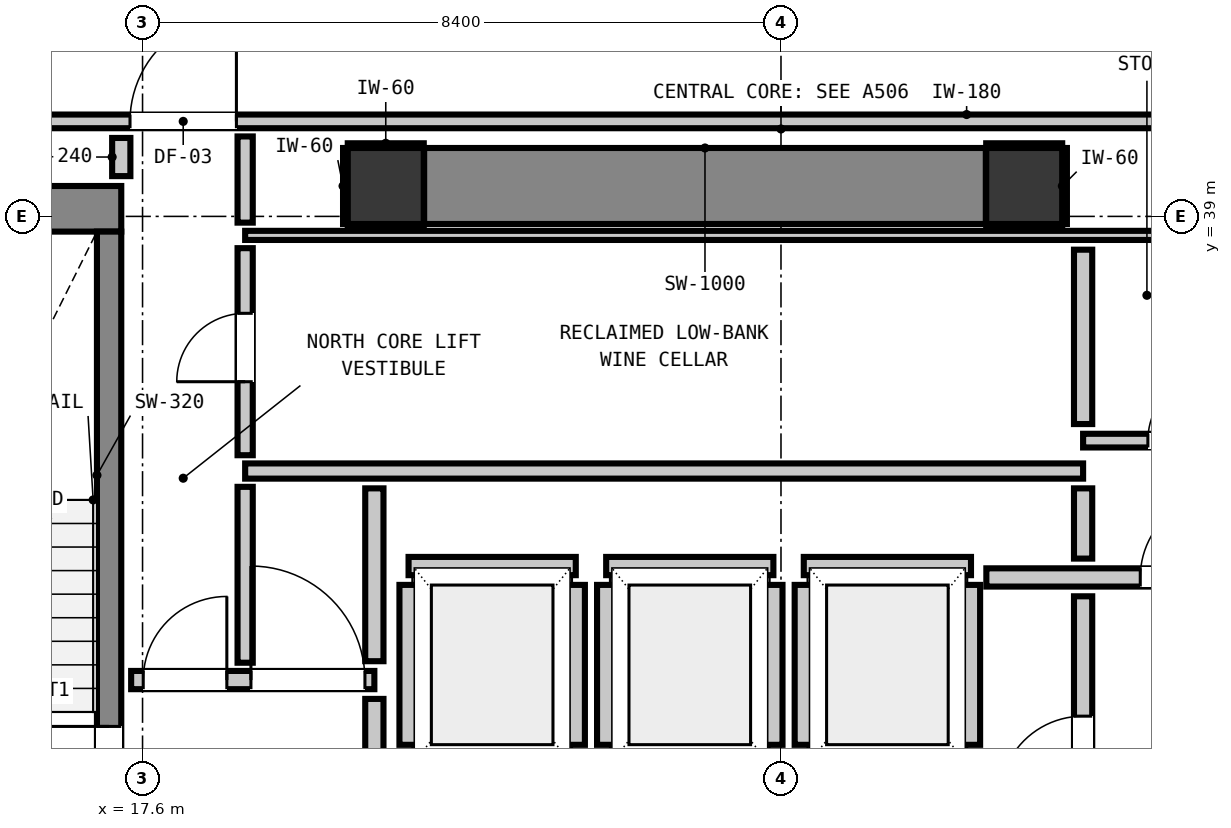
"""IFC4 building model, lengths in metres.
Left out: names, types, materials, properties, quantities, classifications, styles, units other than length and angle.
Written with IfcOpenShell. Run it as: python <this file> out.ifc"""

import sys

from ifc_helpers import new_model, si_unit, direction, frame, frame_2d, origin, origin_2d, place, context, subcontext, project, spatial, rectangle, extrude, element, fill, save


model = new_model("IFC4")
c1 = context("Model", 3, precision=1e-05, world=origin(), true_north=direction((0.0, 1.0)))
c2 = subcontext(c1, "Body", "Model", "MODEL_VIEW")
j1 = project(units=[si_unit("LENGTHUNIT", "METRE"), si_unit("PLANEANGLEUNIT", "RADIAN")], contexts=[c1])
p1 = place(None, origin())
s1 = spatial("IfcSite", under=j1, at=p1, CompositionType="ELEMENT")
p2 = place(p1, origin())
s2 = spatial("IfcBuilding", under=s1, at=p2, CompositionType="ELEMENT")
p3 = place(p2, frame((0.0, 0.0, 96.12)))
s3 = spatial("IfcBuildingStorey", under=s2, at=p3, CompositionType="ELEMENT", Elevation=96.12)
for number, where, z_axis, x_axis in (
    (1, (20.8, 39.4, 0.0), (0.0, 0.0, 1.0), (1.0, 0.0, 0.0)),
    (2, (29.2, 39.4, 0.0), (0.0, 0.0, 1.0), (1.0, 0.0, 0.0)),
):
    element("IfcColumn", number, at=place(p3, frame(where, z_axis=z_axis, x_axis=x_axis)), inside=s3, PredefinedType="COLUMN", context=c2, shape_type="SweptSolid", body=[
        extrude(rectangle(XDim=1.0, YDim=1.0, at=origin_2d()), origin(), (0.0, 0.0, 1.0), 3.32),
    ])
p4 = place(p3, frame((13.24, 39.1, 0.0), z_axis=(0.0, 0.0, 1.0), x_axis=(1.0, 0.0, 0.0)))
e3 = element("IfcWall", 3, at=p4, inside=s3, PredefinedType="SHEAR", context=c2, shape_type="SweptSolid", body=[
    extrude(rectangle(XDim=4.08, YDim=0.6, at=frame_2d((2.04, 0.0))), origin(), (0.0, 0.0, 1.0), 3.32),
])
p5 = place(p3, frame((21.305, 39.4, 0.0), z_axis=(0.0, 0.0, 1.0), x_axis=(1.0, 0.0, 0.0)))
e4 = element("IfcWall", 4, at=p5, inside=s3, PredefinedType="SHEAR", context=c2, shape_type="SweptSolid", body=[
    extrude(rectangle(XDim=7.39, YDim=1.0, at=frame_2d((3.695, 0.0))), origin(), (0.0, 0.0, 1.0), 3.32),
])
p6 = place(p3, frame((17.16, 31.0, 0.0), z_axis=(0.0, 0.0, 1.0), x_axis=(0.0, 1.0, 0.0)))
e5 = element("IfcWall", 5, at=p6, inside=s3, PredefinedType="SHEAR", context=c2, shape_type="SweptSolid", body=[
    extrude(rectangle(XDim=7.8, YDim=0.32, at=frame_2d((3.9, 0.0))), origin(), (0.0, 0.0, 1.0), 3.32),
])
p7 = place(p6, frame((0.19, 0.0, 0.0)))
e6 = element("IfcOpeningElement", 6, at=p7, cuts=e5, PredefinedType="OPENING", context=c2, shape_type="SweptSolid", body=[
    extrude(rectangle(XDim=1.1, YDim=2.15, at=frame_2d((0.55, 1.075))), frame((0.0, 0.17, 0.0), z_axis=(0.0, -1.0, 0.0), x_axis=(1.0, 0.0, 0.0)), (0.0, 0.0, 1.0), 0.34),
])
p8 = place(p3, frame((21.1, 34.4, 0.0), z_axis=(0.0, 0.0, 1.0), x_axis=(1.0, 0.0, 0.0)))
e7 = element("IfcWall", 7, at=p8, inside=s3, PredefinedType="PARTITIONING", context=c2, shape_type="SweptSolid", body=[
    extrude(rectangle(XDim=2.2, YDim=0.24, at=frame_2d((1.1, 0.0))), origin(), (0.0, 0.0, 1.0), 3.06),
])
p9 = place(p3, frame((21.1, 32.048, 0.0), z_axis=(0.0, 0.0, 1.0), x_axis=(0.0, 1.0, 0.0)))
e8 = element("IfcWall", 8, at=p9, inside=s3, PredefinedType="PARTITIONING", context=c2, shape_type="SweptSolid", body=[
    extrude(rectangle(XDim=2.104, YDim=0.24, at=frame_2d((1.052, 0.0))), origin(), (0.0, 0.0, 1.0), 2.295),
])
p10 = place(p3, frame((23.3, 32.048, 0.0), z_axis=(0.0, 0.0, 1.0), x_axis=(0.0, 1.0, 0.0)))
e9 = element("IfcWall", 9, at=p10, inside=s3, PredefinedType="PARTITIONING", context=c2, shape_type="SweptSolid", body=[
    extrude(rectangle(XDim=2.104, YDim=0.24, at=frame_2d((1.052, 0.0))), origin(), (0.0, 0.0, 1.0), 3.06),
])
p11 = place(p3, frame((23.7, 34.4, 0.0), z_axis=(0.0, 0.0, 1.0), x_axis=(1.0, 0.0, 0.0)))
e10 = element("IfcWall", 10, at=p11, inside=s3, PredefinedType="PARTITIONING", context=c2, shape_type="SweptSolid", body=[
    extrude(rectangle(XDim=2.2, YDim=0.24, at=frame_2d((1.1, 0.0))), origin(), (0.0, 0.0, 1.0), 3.06),
])
for number, where, z_axis, x_axis in (
    (11, (23.7, 32.048, 0.0), (0.0, 0.0, 1.0), (0.0, 1.0, 0.0)),
    (12, (25.9, 32.048, 0.0), (0.0, 0.0, 1.0), (0.0, 1.0, 0.0)),
):
    element("IfcWall", number, at=place(p3, frame(where, z_axis=z_axis, x_axis=x_axis)), inside=s3, PredefinedType="PARTITIONING", context=c2, shape_type="SweptSolid", body=[
        extrude(rectangle(XDim=2.104, YDim=0.24, at=frame_2d((1.052, 0.0))), origin(), (0.0, 0.0, 1.0), 3.06),
    ])
p12 = place(p3, frame((26.3, 34.4, 0.0), z_axis=(0.0, 0.0, 1.0), x_axis=(1.0, 0.0, 0.0)))
e13 = element("IfcWall", 13, at=p12, inside=s3, PredefinedType="PARTITIONING", context=c2, shape_type="SweptSolid", body=[
    extrude(rectangle(XDim=2.2, YDim=0.24, at=frame_2d((1.1, 0.0))), origin(), (0.0, 0.0, 1.0), 3.06),
])
for number, where, z_axis, x_axis in (
    (14, (26.3, 32.048, 0.0), (0.0, 0.0, 1.0), (0.0, 1.0, 0.0)),
    (15, (28.5, 32.048, 0.0), (0.0, 0.0, 1.0), (0.0, 1.0, 0.0)),
):
    element("IfcWall", number, at=place(p3, frame(where, z_axis=z_axis, x_axis=x_axis)), inside=s3, PredefinedType="PARTITIONING", context=c2, shape_type="SweptSolid", body=[
        extrude(rectangle(XDim=2.104, YDim=0.24, at=frame_2d((1.052, 0.0))), origin(), (0.0, 0.0, 1.0), 3.06),
    ])
p13 = place(p3, frame((17.45, 32.9, 0.0), z_axis=(0.0, 0.0, 1.0), x_axis=(1.0, 0.0, 0.0)))
e16 = element("IfcWall", 16, at=p13, inside=s3, PredefinedType="PARTITIONING", context=c2, shape_type="SweptSolid", body=[
    extrude(rectangle(XDim=3.2, YDim=0.24, at=frame_2d((1.6, 0.0))), origin(), (0.0, 0.0, 1.0), 3.06),
])
p14 = place(p13, frame((0.159, 0.0, 0.0)))
e17 = element("IfcOpeningElement", 17, at=p14, cuts=e16, PredefinedType="OPENING", context=c2, shape_type="SweptSolid", body=[
    extrude(rectangle(XDim=1.1, YDim=2.15, at=frame_2d((0.55, 1.075))), frame((0.0, 0.13, 0.0), z_axis=(0.0, -1.0, 0.0), x_axis=(1.0, 0.0, 0.0)), (0.0, 0.0, 1.0), 0.26),
])
p15 = place(p13, frame((1.576, 0.0, 0.0)))
e18 = element("IfcOpeningElement", 18, at=p15, cuts=e16, PredefinedType="OPENING", context=c2, shape_type="SweptSolid", body=[
    extrude(rectangle(XDim=1.5, YDim=2.15, at=frame_2d((0.75, 1.075))), frame((0.0, 0.13, 0.0), z_axis=(0.0, -1.0, 0.0), x_axis=(1.0, 0.0, 0.0)), (0.0, 0.0, 1.0), 0.26),
])
p16 = place(p3, frame((28.702, 34.25, 0.0), z_axis=(0.0, 0.0, 1.0), x_axis=(1.0, 0.0, 0.0)))
e19 = element("IfcWall", 19, at=p16, inside=s3, PredefinedType="PARTITIONING", context=c2, shape_type="SweptSolid", body=[
    extrude(rectangle(XDim=3.748, YDim=0.24, at=frame_2d((1.874, 0.0))), origin(), (0.0, 0.0, 1.0), 3.06),
])
p17 = place(p16, frame((2.025, 0.0, 0.0)))
e20 = element("IfcOpeningElement", 20, at=p17, cuts=e19, PredefinedType="OPENING", context=c2, shape_type="SweptSolid", body=[
    extrude(rectangle(XDim=1.1, YDim=2.15, at=frame_2d((0.55, 1.075))), frame((0.0, 0.13, 0.0), z_axis=(0.0, -1.0, 0.0), x_axis=(1.0, 0.0, 0.0)), (0.0, 0.0, 1.0), 0.26),
])
p18 = place(p3, frame((18.95, 35.65, 0.0), z_axis=(0.0, 0.0, 1.0), x_axis=(1.0, 0.0, 0.0)))
e21 = element("IfcWall", 21, at=p18, inside=s3, PredefinedType="PARTITIONING", context=c2, shape_type="SweptSolid", body=[
    extrude(rectangle(XDim=11.025, YDim=0.2, at=frame_2d((5.513, 0.0))), origin(), (0.0, 0.0, 1.0), 3.06),
])
p19 = place(p3, frame((29.975, 36.05, 0.0), z_axis=(0.0, 0.0, 1.0), x_axis=(1.0, 0.0, 0.0)))
e22 = element("IfcWall", 22, at=p19, inside=s3, PredefinedType="PARTITIONING", context=c2, shape_type="SweptSolid", body=[
    extrude(rectangle(XDim=2.505, YDim=0.18, at=frame_2d((1.252, 0.0))), origin(), (0.0, 0.0, 1.0), 3.06),
])
p20 = place(p19, frame((0.852, 0.0, 0.0)))
e23 = element("IfcOpeningElement", 23, at=p20, cuts=e22, PredefinedType="OPENING", context=c2, shape_type="SweptSolid", body=[
    extrude(rectangle(XDim=0.9, YDim=2.1, at=frame_2d((0.45, 1.05))), frame((0.0, 0.1, 0.0), z_axis=(0.0, -1.0, 0.0), x_axis=(1.0, 0.0, 0.0)), (0.0, 0.0, 1.0), 0.2),
])
p21 = place(p3, frame((1.827, 40.25, 0.0), z_axis=(0.0, 0.0, 1.0), x_axis=(1.0, 0.0, 0.0)))
e24 = element("IfcWall", 24, at=p21, inside=s3, PredefinedType="PARTITIONING", context=c2, shape_type="SweptSolid", body=[
    extrude(rectangle(XDim=42.146, YDim=0.18, at=frame_2d((21.073, 0.0))), origin(), (0.0, 0.0, 1.0), 3.06),
])
p22 = place(p21, frame((15.608, 0.0, 0.0)))
e25 = element("IfcOpeningElement", 25, at=p22, cuts=e24, PredefinedType="OPENING", context=c2, shape_type="SweptSolid", body=[
    extrude(rectangle(XDim=1.4, YDim=2.15, at=frame_2d((0.7, 1.075))), frame((0.0, 0.1, 0.0), z_axis=(0.0, -1.0, 0.0), x_axis=(1.0, 0.0, 0.0)), (0.0, 0.0, 1.0), 0.2),
])
p23 = place(p21, frame((8.623, 0.0, 0.0)))
e26 = element("IfcOpeningElement", 26, at=p23, cuts=e24, PredefinedType="OPENING", context=c2, shape_type="SweptSolid", body=[
    extrude(rectangle(XDim=1.4, YDim=2.15, at=frame_2d((0.7, 1.075))), frame((0.0, 0.1, 0.0), z_axis=(0.0, -1.0, 0.0), x_axis=(1.0, 0.0, 0.0)), (0.0, 0.0, 1.0), 0.2),
])
p24 = place(p21, frame((36.223, 0.0, 0.0)))
e27 = element("IfcOpeningElement", 27, at=p24, cuts=e24, PredefinedType="OPENING", context=c2, shape_type="SweptSolid", body=[
    extrude(rectangle(XDim=1.4, YDim=2.15, at=frame_2d((0.7, 1.075))), frame((0.0, 0.1, 0.0), z_axis=(0.0, -1.0, 0.0), x_axis=(1.0, 0.0, 0.0)), (0.0, 0.0, 1.0), 0.2),
])
p25 = place(p3, frame((18.95, 38.75, 0.0), z_axis=(0.0, 0.0, 1.0), x_axis=(1.0, 0.0, 0.0)))
e28 = element("IfcWall", 28, at=p25, inside=s3, PredefinedType="PARTITIONING", context=c2, shape_type="SweptSolid", body=[
    extrude(rectangle(XDim=13.56, YDim=0.12, at=frame_2d((6.78, 0.0))), origin(), (0.0, 0.0, 1.0), 3.06),
])
p26 = place(p3, frame((17.32, 39.53, 0.0), z_axis=(0.0, 0.0, 1.0), x_axis=(0.0, 1.0, 0.0)))
e29 = element("IfcWall", 29, at=p26, inside=s3, PredefinedType="PARTITIONING", context=c2, shape_type="SweptSolid", body=[
    extrude(rectangle(XDim=0.502, YDim=0.24, at=frame_2d((0.251, 0.0))), origin(), (0.0, 0.0, 1.0), 3.06),
])
p27 = place(p3, frame((20.65, 31.868, 0.0), z_axis=(0.0, 0.0, 1.0), x_axis=(0.0, 1.0, 0.0)))
e30 = element("IfcWall", 30, at=p27, inside=s3, PredefinedType="PARTITIONING", context=c2, shape_type="SweptSolid", body=[
    extrude(rectangle(XDim=0.784, YDim=0.24, at=frame_2d((0.392, 0.0))), origin(), (0.0, 0.0, 1.0), 2.295),
])
p28 = place(p3, frame((20.65, 33.148, 0.0), z_axis=(0.0, 0.0, 1.0), x_axis=(0.0, 1.0, 0.0)))
e31 = element("IfcWall", 31, at=p28, inside=s3, PredefinedType="PARTITIONING", context=c2, shape_type="SweptSolid", body=[
    extrude(rectangle(XDim=2.274, YDim=0.24, at=frame_2d((1.137, 0.0))), origin(), (0.0, 0.0, 1.0), 2.295),
])
p29 = place(p3, frame((29.975, 29.768, 0.0), z_axis=(0.0, 0.0, 1.0), x_axis=(0.0, 1.0, 0.0)))
e32 = element("IfcWall", 32, at=p29, inside=s3, PredefinedType="PARTITIONING", context=c2, shape_type="SweptSolid", body=[
    extrude(rectangle(XDim=4.234, YDim=0.24, at=frame_2d((2.117, 0.0))), origin(), (0.0, 0.0, 1.0), 3.06),
])
p30 = place(p29, frame((1.557, 0.0, 0.0)))
e33 = element("IfcOpeningElement", 33, at=p30, cuts=e32, PredefinedType="OPENING", context=c2, shape_type="SweptSolid", body=[
    extrude(rectangle(XDim=1.1, YDim=2.15, at=frame_2d((0.55, 1.075))), frame((0.0, 0.13, 0.0), z_axis=(0.0, -1.0, 0.0), x_axis=(1.0, 0.0, 0.0)), (0.0, 0.0, 1.0), 0.26),
])
p31 = place(p3, frame((29.975, 34.498, 0.0), z_axis=(0.0, 0.0, 1.0), x_axis=(0.0, 1.0, 0.0)))
e34 = element("IfcWall", 34, at=p31, inside=s3, PredefinedType="PARTITIONING", context=c2, shape_type="SweptSolid", body=[
    extrude(rectangle(XDim=0.924, YDim=0.24, at=frame_2d((0.462, 0.0))), origin(), (0.0, 0.0, 1.0), 3.06),
])
p32 = place(p3, frame((29.975, 36.268, 0.0), z_axis=(0.0, 0.0, 1.0), x_axis=(0.0, 1.0, 0.0)))
e35 = element("IfcWall", 35, at=p32, inside=s3, PredefinedType="PARTITIONING", context=c2, shape_type="SweptSolid", body=[
    extrude(rectangle(XDim=2.294, YDim=0.24, at=frame_2d((1.147, 0.0))), origin(), (0.0, 0.0, 1.0), 3.06),
])
p33 = place(p3, frame((18.95, 33.128, 0.0), z_axis=(0.0, 0.0, 1.0), x_axis=(0.0, 1.0, 0.0)))
e36 = element("IfcWall", 36, at=p33, inside=s3, PredefinedType="PARTITIONING", context=c2, shape_type="SweptSolid", body=[
    extrude(rectangle(XDim=2.314, YDim=0.2, at=frame_2d((1.157, 0.0))), origin(), (0.0, 0.0, 1.0), 3.06),
])
p34 = place(p3, frame((18.95, 35.858, 0.0), z_axis=(0.0, 0.0, 1.0), x_axis=(0.0, 1.0, 0.0)))
e37 = element("IfcWall", 37, at=p34, inside=s3, PredefinedType="PARTITIONING", context=c2, shape_type="SweptSolid", body=[
    extrude(rectangle(XDim=2.724, YDim=0.2, at=frame_2d((1.362, 0.0))), origin(), (0.0, 0.0, 1.0), 3.06),
])
p35 = place(p34, frame((0.967, 0.0, 0.0)))
e38 = element("IfcOpeningElement", 38, at=p35, cuts=e37, PredefinedType="OPENING", context=c2, shape_type="SweptSolid", body=[
    extrude(rectangle(XDim=0.9, YDim=2.1, at=frame_2d((0.45, 1.05))), frame((0.0, 0.11, 0.0), z_axis=(0.0, -1.0, 0.0), x_axis=(1.0, 0.0, 0.0)), (0.0, 0.0, 1.0), 0.22),
])
p36 = place(p3, frame((18.95, 38.918, 0.0), z_axis=(0.0, 0.0, 1.0), x_axis=(0.0, 1.0, 0.0)))
e39 = element("IfcWall", 39, at=p36, inside=s3, PredefinedType="PARTITIONING", context=c2, shape_type="SweptSolid", body=[
    extrude(rectangle(XDim=1.134, YDim=0.2, at=frame_2d((0.567, 0.0))), origin(), (0.0, 0.0, 1.0), 3.06),
])
for number, where, z_axis, x_axis in (
    (40, (20.3, 38.868, 0.0), (0.0, 0.0, 1.0), (1.0, 0.0, 0.0)),
    (41, (20.3, 39.932, 0.0), (0.0, 0.0, 1.0), (1.0, 0.0, 0.0)),
    (42, (20.268, 38.9, 0.0), (0.0, 0.0, 1.0), (0.0, 1.0, 0.0)),
    (43, (28.7, 38.868, 0.0), (0.0, 0.0, 1.0), (1.0, 0.0, 0.0)),
    (44, (28.7, 39.932, 0.0), (0.0, 0.0, 1.0), (1.0, 0.0, 0.0)),
    (45, (29.732, 38.9, 0.0), (0.0, 0.0, 1.0), (0.0, 1.0, 0.0)),
):
    element("IfcWall", number, at=place(p3, frame(where, z_axis=z_axis, x_axis=x_axis)), inside=s3, PredefinedType="PARTITIONING", context=c2, shape_type="SweptSolid", body=[
        extrude(rectangle(XDim=1.0, YDim=0.06, at=frame_2d((0.5, 0.0))), origin(), (0.0, 0.0, 1.0), 1.45),
    ])
p37 = place(p7, origin())
e46 = element("IfcDoor", 46, at=p37, inside=s3, OperationType="SINGLE_SWING_RIGHT", PredefinedType="DOOR", context=c2, shape_type="SweptSolid", body=[
    extrude(rectangle(XDim=1.1, YDim=2.15, at=frame_2d((0.55, 1.075))), frame((0.0, 0.025, 0.0), z_axis=(0.0, -1.0, 0.0), x_axis=(1.0, 0.0, 0.0)), (0.0, 0.0, 1.0), 0.05),
])
fill(e6, e46)
p38 = place(p14, origin())
e47 = element("IfcDoor", 47, at=p38, inside=s3, OperationType="SINGLE_SWING_RIGHT", PredefinedType="DOOR", context=c2, shape_type="SweptSolid", body=[
    extrude(rectangle(XDim=1.1, YDim=2.15, at=frame_2d((0.55, 1.075))), frame((0.0, 0.025, 0.0), z_axis=(0.0, -1.0, 0.0), x_axis=(1.0, 0.0, 0.0)), (0.0, 0.0, 1.0), 0.05),
])
fill(e17, e47)
p39 = place(p30, origin())
e48 = element("IfcDoor", 48, at=p39, inside=s3, OperationType="SINGLE_SWING_LEFT", PredefinedType="DOOR", context=c2, shape_type="SweptSolid", body=[
    extrude(rectangle(XDim=1.1, YDim=2.15, at=frame_2d((0.55, 1.075))), frame((0.0, 0.025, 0.0), z_axis=(0.0, -1.0, 0.0), x_axis=(1.0, 0.0, 0.0)), (0.0, 0.0, 1.0), 0.05),
])
fill(e33, e48)
p40 = place(p17, origin())
e49 = element("IfcDoor", 49, at=p40, inside=s3, OperationType="SINGLE_SWING_RIGHT", PredefinedType="DOOR", context=c2, shape_type="SweptSolid", body=[
    extrude(rectangle(XDim=1.1, YDim=2.15, at=frame_2d((0.55, 1.075))), frame((0.0, 0.025, 0.0), z_axis=(0.0, -1.0, 0.0), x_axis=(1.0, 0.0, 0.0)), (0.0, 0.0, 1.0), 0.05),
])
fill(e20, e49)
p41 = place(p22, origin())
e50 = element("IfcDoor", 50, at=p41, inside=s3, OperationType="SINGLE_SWING_RIGHT", PredefinedType="DOOR", context=c2, shape_type="SweptSolid", body=[
    extrude(rectangle(XDim=1.4, YDim=2.15, at=frame_2d((0.7, 1.075))), frame((0.0, 0.025, 0.0), z_axis=(0.0, -1.0, 0.0), x_axis=(1.0, 0.0, 0.0)), (0.0, 0.0, 1.0), 0.05),
])
fill(e25, e50)
p42 = place(p15, origin())
e51 = element("IfcDoor", 51, at=p42, inside=s3, OperationType="SINGLE_SWING_LEFT", PredefinedType="DOOR", context=c2, shape_type="SweptSolid", body=[
    extrude(rectangle(XDim=1.5, YDim=2.15, at=frame_2d((0.75, 1.075))), frame((0.0, 0.025, 0.0), z_axis=(0.0, -1.0, 0.0), x_axis=(1.0, 0.0, 0.0)), (0.0, 0.0, 1.0), 0.05),
])
fill(e18, e51)
p43 = place(p20, origin())
e52 = element("IfcDoor", 52, at=p43, inside=s3, OperationType="SINGLE_SWING_RIGHT", PredefinedType="DOOR", context=c2, shape_type="SweptSolid", body=[
    extrude(rectangle(XDim=0.9, YDim=2.1, at=frame_2d((0.45, 1.05))), frame((0.0, 0.025, 0.0), z_axis=(0.0, -1.0, 0.0), x_axis=(1.0, 0.0, 0.0)), (0.0, 0.0, 1.0), 0.05),
])
fill(e23, e52)
p44 = place(p35, origin())
e53 = element("IfcDoor", 53, at=p44, inside=s3, OperationType="SINGLE_SWING_LEFT", PredefinedType="DOOR", context=c2, shape_type="SweptSolid", body=[
    extrude(rectangle(XDim=0.9, YDim=2.1, at=frame_2d((0.45, 1.05))), frame((0.0, 0.025, 0.0), z_axis=(0.0, -1.0, 0.0), x_axis=(1.0, 0.0, 0.0)), (0.0, 0.0, 1.0), 0.05),
])
fill(e38, e53)
save(model, sys.argv[1])
